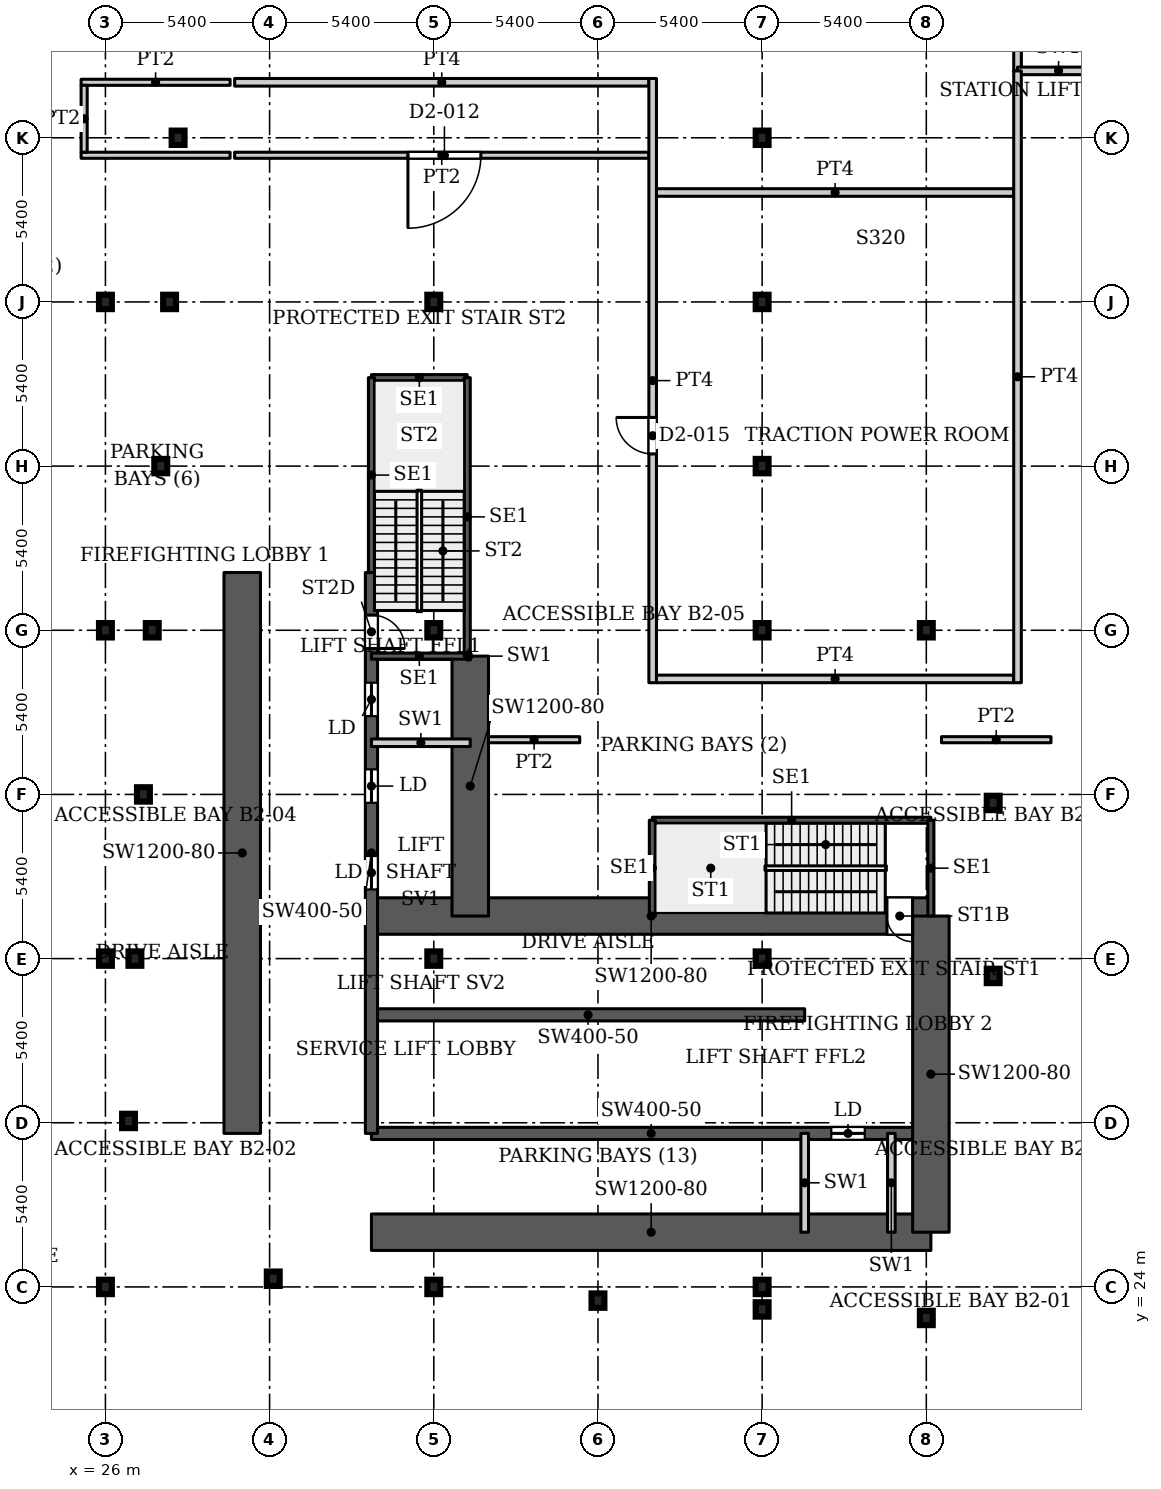
"""IFC4 building model, lengths in metres.
Left out: names, types, materials, properties, quantities, classifications, styles, units other than length and angle.
Written with IfcOpenShell. Run it as: python <this file> out.ifc"""

import sys

from ifc_helpers import new_model, si_unit, direction, frame, frame_2d, origin, origin_2d, place, context, subcontext, project, spatial, rectangle, i_section, extrude, source, transform, mapped, element, fill, save


model = new_model("IFC4")
c1 = context("Model", 3, precision=1e-05, world=origin(), true_north=direction((0.0, 1.0)))
c2 = subcontext(c1, "Body", "Model", "MODEL_VIEW")
j1 = project(units=[si_unit("LENGTHUNIT", "METRE"), si_unit("PLANEANGLEUNIT", "RADIAN")], contexts=[c1])
p1 = place(None, origin())
s1 = spatial("IfcSite", under=j1, at=p1, CompositionType="ELEMENT")
p2 = place(p1, origin())
s2 = spatial("IfcBuilding", under=s1, at=p2, CompositionType="ELEMENT")
p3 = place(p2, frame((0.0, 0.0, -10.0)))
s3 = spatial("IfcBuildingStorey", under=s2, at=p3, CompositionType="ELEMENT", Elevation=-10.0)
for number, where, z_axis, x_axis in (
    (1, (26.0, 24.0, 0.0), (0.0, 0.0, 1.0), (1.0, 0.0, 0.0)),
    (2, (36.8, 24.0, 0.0), (0.0, 0.0, 1.0), (1.0, 0.0, 0.0)),
    (3, (47.6, 24.0, 0.0), (0.0, 0.0, 1.0), (1.0, 0.0, 0.0)),
    (4, (26.0, 34.8, 0.0), (0.0, 0.0, 1.0), (1.0, 0.0, 0.0)),
    (5, (36.8, 34.8, 0.0), (0.0, 0.0, 1.0), (1.0, 0.0, 0.0)),
    (6, (47.6, 34.8, 0.0), (0.0, 0.0, 1.0), (1.0, 0.0, 0.0)),
    (7, (26.0, 45.6, 0.0), (0.0, 0.0, 1.0), (1.0, 0.0, 0.0)),
    (8, (36.8, 45.6, 0.0), (0.0, 0.0, 1.0), (1.0, 0.0, 0.0)),
    (9, (47.6, 45.6, 0.0), (0.0, 0.0, 1.0), (1.0, 0.0, 0.0)),
    (10, (26.0, 56.4, 0.0), (0.0, 0.0, 1.0), (1.0, 0.0, 0.0)),
    (11, (36.8, 56.4, 0.0), (0.0, 0.0, 1.0), (1.0, 0.0, 0.0)),
    (12, (47.6, 56.4, 0.0), (0.0, 0.0, 1.0), (1.0, 0.0, 0.0)),
    (13, (53.0, 22.98, 0.0), (0.0, 0.0, 1.0), (1.0, 0.0, 0.0)),
    (14, (47.6, 23.26, 0.0), (0.0, 0.0, 1.0), (1.0, 0.0, 0.0)),
    (15, (42.2, 23.55, 0.0), (0.0, 0.0, 1.0), (1.0, 0.0, 0.0)),
    (16, (31.52, 24.27, 0.0), (0.0, 0.0, 1.0), (1.0, 0.0, 0.0)),
    (17, (26.76, 29.46, 0.0), (0.0, 0.0, 1.0), (1.0, 0.0, 0.0)),
    (18, (26.97, 34.8, 0.0), (0.0, 0.0, 1.0), (1.0, 0.0, 0.0)),
    (19, (27.25, 40.2, 0.0), (0.0, 0.0, 1.0), (1.0, 0.0, 0.0)),
    (20, (27.54, 45.6, 0.0), (0.0, 0.0, 1.0), (1.0, 0.0, 0.0)),
    (21, (53.0, 45.6, 0.0), (0.0, 0.0, 1.0), (1.0, 0.0, 0.0)),
    (22, (27.82, 51.0, 0.0), (0.0, 0.0, 1.0), (1.0, 0.0, 0.0)),
    (23, (47.6, 51.0, 0.0), (0.0, 0.0, 1.0), (1.0, 0.0, 0.0)),
    (24, (28.11, 56.4, 0.0), (0.0, 0.0, 1.0), (1.0, 0.0, 0.0)),
    (25, (28.39, 61.8, 0.0), (0.0, 0.0, 1.0), (1.0, 0.0, 0.0)),
    (26, (47.6, 61.8, 0.0), (0.0, 0.0, 1.0), (1.0, 0.0, 0.0)),
    (27, (55.2, 34.23, 0.0), (0.0, 0.0, 1.0), (1.0, 0.0, 0.0)),
    (28, (55.2, 39.92, 0.0), (0.0, 0.0, 1.0), (1.0, 0.0, 0.0)),
):
    element("IfcColumn", number, at=place(p3, frame(where, z_axis=z_axis, x_axis=x_axis)), inside=s3, PredefinedType="COLUMN", context=c2, shape_type="SweptSolid", body=[
        extrude(i_section(OverallWidth=0.424, OverallDepth=0.474, WebThickness=0.048, FlangeThickness=0.077, FilletRadius=0.014, at=origin_2d()), origin(), (0.0, 0.0, 1.0), 5.0),
    ])
p4 = place(p3, frame((34.75, 25.8, 0.0), z_axis=(0.0, 0.0, 1.0), x_axis=(1.0, 0.0, 0.0)))
e29 = element("IfcWall", 29, at=p4, inside=s3, PredefinedType="SHEAR", context=c2, shape_type="SweptSolid", body=[
    extrude(rectangle(XDim=18.4, YDim=1.2, at=frame_2d((9.2, 0.0))), origin(), (0.0, 0.0, 1.0), 5.0),
])
p5 = place(p3, frame((34.75, 29.05, 0.0), z_axis=(0.0, 0.0, 1.0), x_axis=(1.0, 0.0, 0.0)))
e30 = element("IfcWall", 30, at=p5, inside=s3, PredefinedType="SHEAR", context=c2, shape_type="SweptSolid", body=[
    extrude(rectangle(XDim=18.4, YDim=0.4, at=frame_2d((9.2, 0.0))), origin(), (0.0, 0.0, 1.0), 5.0),
])
p6 = place(p5, frame((15.125, 0.0, 0.0)))
e31 = element("IfcOpeningElement", 31, at=p6, cuts=e30, PredefinedType="OPENING", context=c2, shape_type="SweptSolid", body=[
    extrude(rectangle(XDim=1.1, YDim=2.2, at=frame_2d((0.55, 1.1))), frame((0.0, 0.21, 0.0), z_axis=(0.0, -1.0, 0.0), x_axis=(1.0, 0.0, 0.0)), (0.0, 0.0, 1.0), 0.42),
])
p7 = place(p3, frame((34.75, 32.95, 0.0), z_axis=(0.0, 0.0, 1.0), x_axis=(1.0, 0.0, 0.0)))
e32 = element("IfcWall", 32, at=p7, inside=s3, PredefinedType="SHEAR", context=c2, shape_type="SweptSolid", body=[
    extrude(rectangle(XDim=14.25, YDim=0.4, at=frame_2d((7.125, 0.0))), origin(), (0.0, 0.0, 1.0), 5.0),
])
p8 = place(p3, frame((34.75, 36.2, 0.0), z_axis=(0.0, 0.0, 1.0), x_axis=(1.0, 0.0, 0.0)))
e33 = element("IfcWall", 33, at=p8, inside=s3, PredefinedType="SHEAR", context=c2, shape_type="SweptSolid", body=[
    extrude(rectangle(XDim=18.4, YDim=1.2, at=frame_2d((9.2, 0.0))), origin(), (0.0, 0.0, 1.0), 5.0),
])
p9 = place(p8, frame((16.955, 0.0, 0.0)))
e34 = element("IfcOpeningElement", 34, at=p9, cuts=e33, PredefinedType="OPENING", context=c2, shape_type="SweptSolid", body=[
    extrude(rectangle(XDim=0.843, YDim=2.2, at=frame_2d((0.421, 1.1))), frame((0.0, 0.61, 0.0), z_axis=(0.0, -1.0, 0.0), x_axis=(1.0, 0.0, 0.0)), (0.0, 0.0, 1.0), 1.22),
])
p10 = place(p3, frame((34.75, 29.05, 0.0), z_axis=(0.0, 0.0, 1.0), x_axis=(0.0, 1.0, 0.0)))
e35 = element("IfcWall", 35, at=p10, inside=s3, PredefinedType="SHEAR", context=c2, shape_type="SweptSolid", body=[
    extrude(rectangle(XDim=18.45, YDim=0.4, at=frame_2d((9.225, 0.0))), origin(), (0.0, 0.0, 1.0), 5.0),
])
p11 = place(p10, frame((8.025, 0.0, 0.0)))
e36 = element("IfcOpeningElement", 36, at=p11, cuts=e35, PredefinedType="OPENING", context=c2, shape_type="SweptSolid", body=[
    extrude(rectangle(XDim=1.1, YDim=2.2, at=frame_2d((0.55, 1.1))), frame((0.0, 0.21, 0.0), z_axis=(0.0, -1.0, 0.0), x_axis=(1.0, 0.0, 0.0)), (0.0, 0.0, 1.0), 0.42),
])
p12 = place(p10, frame((10.875, 0.0, 0.0)))
e37 = element("IfcOpeningElement", 37, at=p12, cuts=e35, PredefinedType="OPENING", context=c2, shape_type="SweptSolid", body=[
    extrude(rectangle(XDim=1.1, YDim=2.2, at=frame_2d((0.55, 1.1))), frame((0.0, 0.21, 0.0), z_axis=(0.0, -1.0, 0.0), x_axis=(1.0, 0.0, 0.0)), (0.0, 0.0, 1.0), 0.42),
])
p13 = place(p10, frame((13.725, 0.0, 0.0)))
e38 = element("IfcOpeningElement", 38, at=p13, cuts=e35, PredefinedType="OPENING", context=c2, shape_type="SweptSolid", body=[
    extrude(rectangle(XDim=1.1, YDim=2.2, at=frame_2d((0.55, 1.1))), frame((0.0, 0.21, 0.0), z_axis=(0.0, -1.0, 0.0), x_axis=(1.0, 0.0, 0.0)), (0.0, 0.0, 1.0), 0.42),
])
p14 = place(p10, frame((15.95, 0.0, 0.0)))
e39 = element("IfcOpeningElement", 39, at=p14, cuts=e35, PredefinedType="OPENING", context=c2, shape_type="SweptSolid", body=[
    extrude(rectangle(XDim=1.1, YDim=2.2, at=frame_2d((0.55, 1.1))), frame((0.0, 0.21, 0.0), z_axis=(0.0, -1.0, 0.0), x_axis=(1.0, 0.0, 0.0)), (0.0, 0.0, 1.0), 0.42),
])
p15 = place(p3, frame((38.0, 36.2, 0.0), z_axis=(0.0, 0.0, 1.0), x_axis=(0.0, 1.0, 0.0)))
e40 = element("IfcWall", 40, at=p15, inside=s3, PredefinedType="SHEAR", context=c2, shape_type="SweptSolid", body=[
    extrude(rectangle(XDim=8.55, YDim=1.2, at=frame_2d((4.275, 0.0))), origin(), (0.0, 0.0, 1.0), 5.0),
])
p16 = place(p3, frame((30.5, 29.05, 0.0), z_axis=(0.0, 0.0, 1.0), x_axis=(0.0, 1.0, 0.0)))
e41 = element("IfcWall", 41, at=p16, inside=s3, PredefinedType="SHEAR", context=c2, shape_type="SweptSolid", body=[
    extrude(rectangle(XDim=18.45, YDim=1.2, at=frame_2d((9.225, 0.0))), origin(), (0.0, 0.0, 1.0), 5.0),
])
p17 = place(p3, frame((53.15, 25.8, 0.0), z_axis=(0.0, 0.0, 1.0), x_axis=(0.0, 1.0, 0.0)))
e42 = element("IfcWall", 42, at=p17, inside=s3, PredefinedType="SHEAR", context=c2, shape_type="SweptSolid", body=[
    extrude(rectangle(XDim=10.4, YDim=1.2, at=frame_2d((5.2, 0.0))), origin(), (0.0, 0.0, 1.0), 5.0),
])
p18 = place(p3, frame((43.99, 39.35, 0.0), z_axis=(0.0, 0.0, 1.0), x_axis=(1.0, 0.0, 0.0)))
e43 = element("IfcWall", 43, at=p18, inside=s3, PredefinedType="SHEAR", context=c2, shape_type="SweptSolid", body=[
    extrude(rectangle(XDim=9.16, YDim=0.2, at=frame_2d((4.58, 0.0))), origin(), (0.0, 0.0, 1.0), 5.0),
])
for number, where, z_axis, x_axis in (
    (44, (43.99, 36.2, 0.0), (0.0, 0.0, 1.0), (0.0, 1.0, 0.0)),
    (45, (53.15, 36.2, 0.0), (0.0, 0.0, 1.0), (0.0, 1.0, 0.0)),
):
    element("IfcWall", number, at=place(p3, frame(where, z_axis=z_axis, x_axis=x_axis)), inside=s3, PredefinedType="SHEAR", context=c2, shape_type="SweptSolid", body=[
        extrude(rectangle(XDim=3.15, YDim=0.2, at=frame_2d((1.575, 0.0))), origin(), (0.0, 0.0, 1.0), 5.0),
    ])
for number, where, z_axis, x_axis in (
    (46, (34.75, 44.75, 0.0), (0.0, 0.0, 1.0), (1.0, 0.0, 0.0)),
    (47, (34.75, 53.91, 0.0), (0.0, 0.0, 1.0), (1.0, 0.0, 0.0)),
):
    element("IfcWall", number, at=place(p3, frame(where, z_axis=z_axis, x_axis=x_axis)), inside=s3, PredefinedType="SHEAR", context=c2, shape_type="SweptSolid", body=[
        extrude(rectangle(XDim=3.15, YDim=0.2, at=frame_2d((1.575, 0.0))), origin(), (0.0, 0.0, 1.0), 5.0),
    ])
p19 = place(p3, frame((34.75, 47.5, 0.0), z_axis=(0.0, 0.0, 1.0), x_axis=(0.0, 1.0, 0.0)))
e48 = element("IfcWall", 48, at=p19, inside=s3, PredefinedType="SHEAR", context=c2, shape_type="SweptSolid", body=[
    extrude(rectangle(XDim=6.41, YDim=0.2, at=frame_2d((3.205, 0.0))), origin(), (0.0, 0.0, 1.0), 5.0),
])
p20 = place(p3, frame((37.9, 44.75, 0.0), z_axis=(0.0, 0.0, 1.0), x_axis=(0.0, 1.0, 0.0)))
e49 = element("IfcWall", 49, at=p20, inside=s3, PredefinedType="SHEAR", context=c2, shape_type="SweptSolid", body=[
    extrude(rectangle(XDim=9.16, YDim=0.2, at=frame_2d((4.58, 0.0))), origin(), (0.0, 0.0, 1.0), 5.0),
])
for number, where, z_axis, x_axis in (
    (50, (49.0, 25.8, 0.0), (0.0, 0.0, 1.0), (0.0, 1.0, 0.0)),
    (51, (51.85, 25.8, 0.0), (0.0, 0.0, 1.0), (0.0, 1.0, 0.0)),
    (52, (34.75, 41.9, 0.0), (0.0, 0.0, 1.0), (1.0, 0.0, 0.0)),
):
    element("IfcWall", number, at=place(p3, frame(where, z_axis=z_axis, x_axis=x_axis)), inside=s3, PredefinedType="PARTITIONING", context=c2, shape_type="SweptSolid", body=[
        extrude(rectangle(XDim=3.25, YDim=0.25, at=frame_2d((1.625, 0.0))), origin(), (0.0, 0.0, 1.0), 5.0),
    ])
p21 = place(p3, frame((37.9, 44.75, 0.0), z_axis=(0.0, 0.0, 1.0), x_axis=(1.0, 0.0, 0.0)))
e53 = element("IfcWall", 53, at=p21, inside=s3, PredefinedType="PARTITIONING", context=c2, shape_type="SweptSolid", body=[
    extrude(rectangle(XDim=0.1, YDim=0.25, at=frame_2d((0.05, 0.0))), origin(), (0.0, 0.0, 1.0), 5.0),
])
p22 = place(p3, frame((56.0, 64.0, 0.0), z_axis=(0.0, 0.0, 1.0), x_axis=(0.0, 1.0, 0.0)))
e54 = element("IfcWall", 54, at=p22, inside=s3, PredefinedType="PARTITIONING", context=c2, shape_type="SweptSolid", body=[
    extrude(rectangle(XDim=5.4, YDim=0.25, at=frame_2d((2.7, 0.0))), origin(), (0.0, 0.0, 1.0), 5.0),
])
p23 = place(p3, frame((56.0, 64.0, 0.0), z_axis=(0.0, 0.0, 1.0), x_axis=(1.0, 0.0, 0.0)))
e55 = element("IfcWall", 55, at=p23, inside=s3, PredefinedType="PARTITIONING", context=c2, shape_type="SweptSolid", body=[
    extrude(rectangle(XDim=2.7, YDim=0.25, at=frame_2d((1.35, 0.0))), origin(), (0.0, 0.0, 1.0), 5.0),
])
for number, where, z_axis, x_axis in (
    (56, (25.2, 61.225, 0.0), (0.0, 0.0, 1.0), (1.0, 0.0, 0.0)),
    (57, (25.2, 63.625, 0.0), (0.0, 0.0, 1.0), (1.0, 0.0, 0.0)),
):
    element("IfcWall", number, at=place(p3, frame(where, z_axis=z_axis, x_axis=x_axis)), inside=s3, PredefinedType="PARTITIONING", context=c2, shape_type="SweptSolid", body=[
        extrude(rectangle(XDim=4.9, YDim=0.2, at=frame_2d((2.45, 0.0))), origin(), (0.0, 0.0, 1.0), 4.58),
    ])
p24 = place(p3, frame((25.3, 61.325, 0.0), z_axis=(0.0, 0.0, 1.0), x_axis=(0.0, 1.0, 0.0)))
e58 = element("IfcWall", 58, at=p24, inside=s3, PredefinedType="PARTITIONING", context=c2, shape_type="SweptSolid", body=[
    extrude(rectangle(XDim=2.2, YDim=0.2, at=frame_2d((1.1, 0.0))), origin(), (0.0, 0.0, 1.0), 4.58),
])
p25 = place(p3, frame((30.25, 61.225, 0.0), z_axis=(0.0, 0.0, 1.0), x_axis=(1.0, 0.0, 0.0)))
e59 = element("IfcWall", 59, at=p25, inside=s3, PredefinedType="PARTITIONING", context=c2, shape_type="SweptSolid", body=[
    extrude(rectangle(XDim=13.625, YDim=0.2, at=frame_2d((6.812, 0.0))), origin(), (0.0, 0.0, 1.0), 4.58),
])
p26 = place(p25, frame((5.7, 0.0, 0.0)))
e60 = element("IfcOpeningElement", 60, at=p26, cuts=e59, PredefinedType="OPENING", context=c2, shape_type="SweptSolid", body=[
    extrude(rectangle(XDim=2.4, YDim=2.1, at=frame_2d((1.2, 1.05))), frame((0.0, 0.11, 0.0), z_axis=(0.0, -1.0, 0.0), x_axis=(1.0, 0.0, 0.0)), (0.0, 0.0, 1.0), 0.22),
])
p27 = place(p3, frame((30.25, 63.625, 0.0), z_axis=(0.0, 0.0, 1.0), x_axis=(1.0, 0.0, 0.0)))
e61 = element("IfcWall", 61, at=p27, inside=s3, PredefinedType="PARTITIONING", context=c2, shape_type="SweptSolid", body=[
    extrude(rectangle(XDim=13.625, YDim=0.25, at=frame_2d((6.812, 0.0))), origin(), (0.0, 0.0, 1.0), 4.58),
])
p28 = place(p3, frame((38.599, 42.0, 0.0), z_axis=(0.0, 0.0, 1.0), x_axis=(1.0, 0.0, 0.0)))
e62 = element("IfcWall", 62, at=p28, inside=s3, PredefinedType="PARTITIONING", context=c2, shape_type="SweptSolid", body=[
    extrude(rectangle(XDim=3.001, YDim=0.2, at=frame_2d((1.5, 0.0))), origin(), (0.0, 0.0, 1.0), 4.58),
])
p29 = place(p3, frame((44.0, 43.875, 0.0), z_axis=(0.0, 0.0, 1.0), x_axis=(0.0, 1.0, 0.0)))
e63 = element("IfcWall", 63, at=p29, inside=s3, PredefinedType="PARTITIONING", context=c2, shape_type="SweptSolid", body=[
    extrude(rectangle(XDim=19.875, YDim=0.25, at=frame_2d((9.938, 0.0))), origin(), (0.0, 0.0, 1.0), 4.58),
])
p30 = place(p29, frame((7.525, 0.0, 0.0)))
e64 = element("IfcOpeningElement", 64, at=p30, cuts=e63, PredefinedType="OPENING", context=c2, shape_type="SweptSolid", body=[
    extrude(rectangle(XDim=1.2, YDim=2.1, at=frame_2d((0.6, 1.05))), frame((0.0, 0.135, 0.0), z_axis=(0.0, -1.0, 0.0), x_axis=(1.0, 0.0, 0.0)), (0.0, 0.0, 1.0), 0.27),
])
for number, where, z_axis, x_axis in (
    (65, (44.125, 44.0, 0.0), (0.0, 0.0, 1.0), (1.0, 0.0, 0.0)),
    (66, (44.125, 60.0, 0.0), (0.0, 0.0, 1.0), (1.0, 0.0, 0.0)),
):
    element("IfcWall", number, at=place(p3, frame(where, z_axis=z_axis, x_axis=x_axis)), inside=s3, PredefinedType="PARTITIONING", context=c2, shape_type="SweptSolid", body=[
        extrude(rectangle(XDim=11.75, YDim=0.25, at=frame_2d((5.875, 0.0))), origin(), (0.0, 0.0, 1.0), 4.58),
    ])
p31 = place(p3, frame((53.5, 42.0, 0.0), z_axis=(0.0, 0.0, 1.0), x_axis=(1.0, 0.0, 0.0)))
e67 = element("IfcWall", 67, at=p31, inside=s3, PredefinedType="PARTITIONING", context=c2, shape_type="SweptSolid", body=[
    extrude(rectangle(XDim=3.6, YDim=0.2, at=frame_2d((1.8, 0.0))), origin(), (0.0, 0.0, 1.0), 4.58),
])
p32 = place(p3, frame((56.0, 43.875, 0.0), z_axis=(0.0, 0.0, 1.0), x_axis=(0.0, 1.0, 0.0)))
e68 = element("IfcWall", 68, at=p32, inside=s3, PredefinedType="PARTITIONING", context=c2, shape_type="SweptSolid", body=[
    extrude(rectangle(XDim=20.125, YDim=0.25, at=frame_2d((10.062, 0.0))), origin(), (0.0, 0.0, 1.0), 4.58),
])
m1 = source(origin(), c2, "Body", "SweptSolid", [
    extrude(rectangle(XDim=1.1, YDim=2.2, at=frame_2d((0.55, 1.1))), frame((0.0, 0.025, 0.0), z_axis=(0.0, -1.0, 0.0), x_axis=(1.0, 0.0, 0.0)), (0.0, 0.0, 1.0), 0.05),
])
p33 = place(p11, origin())
e69 = element("IfcDoor", 69, at=p33, inside=s3, OperationType="SLIDING_TO_LEFT", PredefinedType="DOOR", context=c2, shape_type="MappedRepresentation", body=[
    mapped(m1, transform((0.0, 0.0, 0.0), x_axis=(1.0, 0.0, 0.0), y_axis=(0.0, 1.0, 0.0), z_axis=(0.0, 0.0, 1.0), scale=1.0)),
])
fill(e36, e69)
p34 = place(p12, origin())
e70 = element("IfcDoor", 70, at=p34, inside=s3, OperationType="SLIDING_TO_LEFT", PredefinedType="DOOR", context=c2, shape_type="MappedRepresentation", body=[
    mapped(m1, transform((0.0, 0.0, 0.0), x_axis=(1.0, 0.0, 0.0), y_axis=(0.0, 1.0, 0.0), z_axis=(0.0, 0.0, 1.0), scale=1.0)),
])
fill(e37, e70)
p35 = place(p13, origin())
e71 = element("IfcDoor", 71, at=p35, inside=s3, OperationType="SLIDING_TO_LEFT", PredefinedType="DOOR", context=c2, shape_type="MappedRepresentation", body=[
    mapped(m1, transform((0.0, 0.0, 0.0), x_axis=(1.0, 0.0, 0.0), y_axis=(0.0, 1.0, 0.0), z_axis=(0.0, 0.0, 1.0), scale=1.0)),
])
fill(e38, e71)
p36 = place(p6, origin())
e72 = element("IfcDoor", 72, at=p36, inside=s3, OperationType="SLIDING_TO_LEFT", PredefinedType="DOOR", context=c2, shape_type="MappedRepresentation", body=[
    mapped(m1, transform((0.0, 0.0, 0.0), x_axis=(1.0, 0.0, 0.0), y_axis=(0.0, 1.0, 0.0), z_axis=(0.0, 0.0, 1.0), scale=1.0)),
])
fill(e31, e72)
m2 = source(origin(), c2, "Body", "SweptSolid", [
    extrude(rectangle(XDim=0.843, YDim=2.2, at=frame_2d((0.421, 1.1))), frame((0.0, 0.025, 0.0), z_axis=(0.0, -1.0, 0.0), x_axis=(1.0, 0.0, 0.0)), (0.0, 0.0, 1.0), 0.05),
])
p37 = place(p9, origin())
e73 = element("IfcDoor", 73, at=p37, inside=s3, OperationType="SINGLE_SWING_RIGHT", PredefinedType="DOOR", context=c2, shape_type="MappedRepresentation", body=[
    mapped(m2, transform((0.0, 0.0, 0.0), x_axis=(1.0, 0.0, 0.0), y_axis=(0.0, 1.0, 0.0), z_axis=(0.0, 0.0, 1.0), scale=1.0)),
])
fill(e34, e73)
m3 = source(origin(), c2, "Body", "SweptSolid", [
    extrude(rectangle(XDim=1.1, YDim=2.2, at=frame_2d((0.55, 1.1))), frame((0.0, 0.025, 0.0), z_axis=(0.0, -1.0, 0.0), x_axis=(1.0, 0.0, 0.0)), (0.0, 0.0, 1.0), 0.05),
])
p38 = place(p14, origin())
e74 = element("IfcDoor", 74, at=p38, inside=s3, OperationType="SINGLE_SWING_RIGHT", PredefinedType="DOOR", context=c2, shape_type="MappedRepresentation", body=[
    mapped(m3, transform((0.0, 0.0, 0.0), x_axis=(1.0, 0.0, 0.0), y_axis=(0.0, 1.0, 0.0), z_axis=(0.0, 0.0, 1.0), scale=1.0)),
])
fill(e39, e74)
m4 = source(origin(), c2, "Body", "SweptSolid", [
    extrude(rectangle(XDim=2.4, YDim=2.1, at=frame_2d((1.2, 1.05))), frame((0.0, 0.025, 0.0), z_axis=(0.0, -1.0, 0.0), x_axis=(1.0, 0.0, 0.0)), (0.0, 0.0, 1.0), 0.05),
])
p39 = place(p26, origin())
e75 = element("IfcDoor", 75, at=p39, inside=s3, OperationType="DOUBLE_DOOR_SINGLE_SWING", PredefinedType="DOOR", context=c2, shape_type="MappedRepresentation", body=[
    mapped(m4, transform((0.0, 0.0, 0.0), x_axis=(1.0, 0.0, 0.0), y_axis=(0.0, 1.0, 0.0), z_axis=(0.0, 0.0, 1.0), scale=1.0)),
])
fill(e60, e75)
m5 = source(origin(), c2, "Body", "SweptSolid", [
    extrude(rectangle(XDim=1.2, YDim=2.1, at=frame_2d((0.6, 1.05))), frame((0.0, 0.025, 0.0), z_axis=(0.0, -1.0, 0.0), x_axis=(1.0, 0.0, 0.0)), (0.0, 0.0, 1.0), 0.05),
])
p40 = place(p30, origin())
e76 = element("IfcDoor", 76, at=p40, inside=s3, OperationType="SINGLE_SWING_LEFT", PredefinedType="DOOR", context=c2, shape_type="MappedRepresentation", body=[
    mapped(m5, transform((0.0, 0.0, 0.0), x_axis=(1.0, 0.0, 0.0), y_axis=(0.0, 1.0, 0.0), z_axis=(0.0, 0.0, 1.0), scale=1.0)),
])
fill(e64, e76)
save(model, sys.argv[1])
